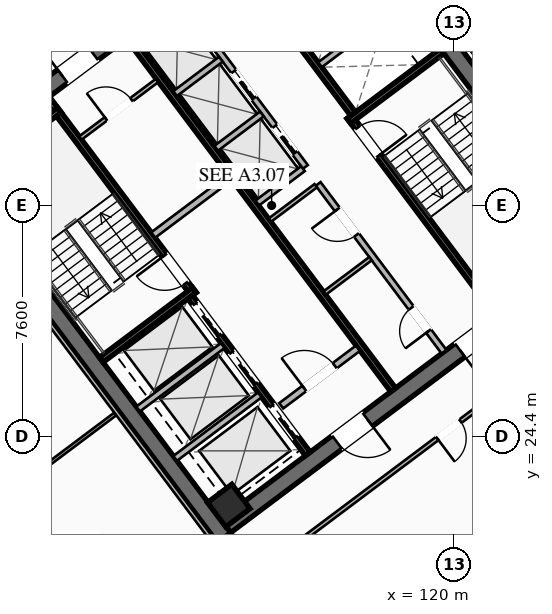
"""IFC4 building model, lengths in metres.
Left out: names, types, materials, properties, quantities, classifications, styles, units other than length and angle.
Written with IfcOpenShell. Run it as: python <this file> out.ifc"""

import sys

from ifc_helpers import new_model, si_unit, direction, frame, frame_2d, origin, origin_2d, place, context, subcontext, project, spatial, rectangle, hollow_rectangle, extrude, element, fill, save


model = new_model("IFC4")
c1 = context("Model", 3, precision=1e-05, world=origin(), true_north=direction((0.0, 1.0)))
c2 = subcontext(c1, "Body", "Model", "MODEL_VIEW")
j1 = project(units=[si_unit("LENGTHUNIT", "METRE"), si_unit("PLANEANGLEUNIT", "RADIAN")], contexts=[c1])
p1 = place(None, origin())
s1 = spatial("IfcSite", under=j1, at=p1, CompositionType="ELEMENT")
p2 = place(p1, origin())
s2 = spatial("IfcBuilding", under=s1, at=p2, CompositionType="ELEMENT")
p3 = place(p2, frame((0.0, 0.0, 192.5)))
s3 = spatial("IfcBuildingStorey", under=s2, at=p3, CompositionType="ELEMENT", Elevation=192.5)
for number, where, z_axis, x_axis in (
    (1, (112.436, 21.077, 0.0), (0.0, 0.0, 1.0), (-0.6, 0.8, 0.0)),
    (2, (115.564, 42.923, 0.0), (0.0, 0.0, 1.0), (0.6, -0.8, 0.0)),
):
    element("IfcWall", number, at=place(p3, frame(where, z_axis=z_axis, x_axis=x_axis)), inside=s3, PredefinedType="SHEAR", context=c2, shape_type="SweptSolid", body=[
        extrude(rectangle(XDim=15.6, YDim=0.55, at=frame_2d((7.8, 0.0))), origin(), (0.0, 0.0, 1.0), 3.55),
    ])
p4 = place(p3, frame((124.539, 30.498, 0.0), z_axis=(0.0, 0.0, 1.0), x_axis=(-0.799998054672, -0.600002593761, 0.0)))
e3 = element("IfcWall", 3, at=p4, inside=s3, PredefinedType="SHEAR", context=c2, shape_type="SweptSolid", body=[
    extrude(rectangle(XDim=15.06, YDim=0.55, at=frame_2d((7.53, 0.0))), origin(), (0.0, 0.0, 1.0), 3.55),
])
p5 = place(p4, frame((9.23, 0.0, 0.0)))
e4 = element("IfcOpeningElement", 4, at=p5, cuts=e3, PredefinedType="OPENING", context=c2, shape_type="SweptSolid", body=[
    extrude(rectangle(XDim=1.25, YDim=2.25, at=frame_2d((0.625, 1.125))), frame((0.0, 0.285, 0.0), z_axis=(0.0, -1.0, 0.0), x_axis=(1.0, 0.0, 0.0)), (0.0, 0.0, 1.0), 0.57),
])
p6 = place(p4, frame((4.18, 0.0, 0.0)))
e5 = element("IfcOpeningElement", 5, at=p6, cuts=e3, PredefinedType="OPENING", context=c2, shape_type="SweptSolid", body=[
    extrude(rectangle(XDim=1.25, YDim=2.25, at=frame_2d((0.625, 1.125))), frame((0.0, 0.285, 0.0), z_axis=(0.0, -1.0, 0.0), x_axis=(1.0, 0.0, 0.0)), (0.0, 0.0, 1.0), 0.57),
])
p7 = place(p3, frame((103.461, 33.502, 0.0), z_axis=(0.0, 0.0, 1.0), x_axis=(0.799998054672, 0.600002593761, 0.0)))
e6 = element("IfcWall", 6, at=p7, inside=s3, PredefinedType="SHEAR", context=c2, shape_type="SweptSolid", body=[
    extrude(rectangle(XDim=15.06, YDim=0.55, at=frame_2d((7.53, 0.0))), origin(), (0.0, 0.0, 1.0), 3.55),
])
p8 = place(p7, frame((4.58, 0.0, 0.0)))
e7 = element("IfcOpeningElement", 7, at=p8, cuts=e6, PredefinedType="OPENING", context=c2, shape_type="SweptSolid", body=[
    extrude(rectangle(XDim=1.25, YDim=2.25, at=frame_2d((0.625, 1.125))), frame((0.0, 0.285, 0.0), z_axis=(0.0, -1.0, 0.0), x_axis=(1.0, 0.0, 0.0)), (0.0, 0.0, 1.0), 0.57),
])
p9 = place(p7, frame((9.63, 0.0, 0.0)))
e8 = element("IfcOpeningElement", 8, at=p9, cuts=e6, PredefinedType="OPENING", context=c2, shape_type="SweptSolid", body=[
    extrude(rectangle(XDim=1.25, YDim=2.25, at=frame_2d((0.625, 1.125))), frame((0.0, 0.285, 0.0), z_axis=(0.0, -1.0, 0.0), x_axis=(1.0, 0.0, 0.0)), (0.0, 0.0, 1.0), 0.57),
])
p10 = place(p3, frame((112.59, 22.13, 0.0), z_axis=(0.0, 0.0, 1.0), x_axis=(0.799999996291, 0.600000004945, 0.0)))
e9 = element("IfcColumn", 9, at=p10, inside=s3, PredefinedType="COLUMN", context=c2, shape_type="SweptSolid", body=[
    extrude(hollow_rectangle(XDim=1.0, YDim=1.0, WallThickness=0.04, at=origin_2d()), origin(), (0.0, 0.0, 1.0), 3.37),
])
p11 = place(p3, frame((111.44, 29.08, 0.0), z_axis=(0.0, 0.0, 1.0), x_axis=(-0.59999029481, 0.8000072788, 0.0)))
e10 = element("IfcWall", 10, at=p11, inside=s3, PredefinedType="SHEAR", context=c2, shape_type="SweptSolid", body=[
    extrude(rectangle(XDim=8.05, YDim=0.2, at=frame_2d((4.025, 0.0))), origin(), (0.0, 0.0, 1.0), 3.37),
])
p12 = place(p11, frame((0.45, 0.0, 0.0)))
e11 = element("IfcOpeningElement", 11, at=p12, cuts=e10, PredefinedType="OPENING", context=c2, shape_type="SweptSolid", body=[
    extrude(rectangle(XDim=1.15, YDim=2.2, at=frame_2d((0.575, 1.1))), frame((0.0, 0.11, 0.0), z_axis=(0.0, -1.0, 0.0), x_axis=(1.0, 0.0, 0.0)), (0.0, 0.0, 1.0), 0.22),
])
for number, where, z_axis, x_axis in (
    (12, (108.396, 26.922, 0.0), (0.0, 0.0, 1.0), (0.8, 0.6, 0.0)),
    (13, (103.956, 32.842, 0.0), (0.0, 0.0, 1.0), (0.8, 0.6, 0.0)),
):
    element("IfcWall", number, at=place(p3, frame(where, z_axis=z_axis, x_axis=x_axis)), inside=s3, PredefinedType="SHEAR", context=c2, shape_type="SweptSolid", body=[
        extrude(rectangle(XDim=3.83, YDim=0.2, at=frame_2d((1.915, 0.0))), origin(), (0.0, 0.0, 1.0), 3.37),
    ])
p13 = place(p3, frame((116.56, 34.92, 0.0), z_axis=(0.0, 0.0, 1.0), x_axis=(0.59999029481, -0.8000072788, 0.0)))
e14 = element("IfcWall", 14, at=p13, inside=s3, PredefinedType="SHEAR", context=c2, shape_type="SweptSolid", body=[
    extrude(rectangle(XDim=8.05, YDim=0.2, at=frame_2d((4.025, 0.0))), origin(), (0.0, 0.0, 1.0), 3.37),
])
p14 = place(p13, frame((0.45, 0.0, 0.0)))
e15 = element("IfcOpeningElement", 15, at=p14, cuts=e14, PredefinedType="OPENING", context=c2, shape_type="SweptSolid", body=[
    extrude(rectangle(XDim=1.15, YDim=2.2, at=frame_2d((0.575, 1.1))), frame((0.0, 0.11, 0.0), z_axis=(0.0, -1.0, 0.0), x_axis=(1.0, 0.0, 0.0)), (0.0, 0.0, 1.0), 0.22),
])
p15 = place(p3, frame((116.54, 34.78, 0.0), z_axis=(0.0, 0.0, 1.0), x_axis=(0.800015298837, 0.599979601008, 0.0)))
e16 = element("IfcWall", 16, at=p15, inside=s3, PredefinedType="SHEAR", context=c2, shape_type="SweptSolid", body=[
    extrude(rectangle(XDim=3.83, YDim=0.2, at=frame_2d((1.915, 0.0))), origin(), (0.0, 0.0, 1.0), 3.37),
])
p16 = place(p3, frame((117.998, 25.936, 0.0), z_axis=(0.0, 0.0, 1.0), x_axis=(-0.600002693989, 0.799997979501, 0.0)))
e17 = element("IfcWall", 17, at=p16, inside=s3, PredefinedType="SHEAR", context=c2, shape_type="SweptSolid", body=[
    extrude(rectangle(XDim=14.5, YDim=0.2, at=frame_2d((7.25, 0.0))), origin(), (0.0, 0.0, 1.0), 3.37),
])
p17 = place(p3, frame((110.104, 31.028, 0.0), z_axis=(0.0, 0.0, 1.0), x_axis=(0.800018601094, 0.59997519774, 0.0)))
e18 = element("IfcWall", 18, at=p17, inside=s3, PredefinedType="SOLIDWALL", context=c2, shape_type="SweptSolid", body=[
    extrude(rectangle(XDim=3.15, YDim=0.22, at=frame_2d((1.575, 0.0))), origin(), (0.0, 0.0, 1.0), 2.723),
])
p18 = place(p3, frame((114.316, 25.412, 0.0), z_axis=(0.0, 0.0, 1.0), x_axis=(0.800018601094, 0.59997519774, 0.0)))
e19 = element("IfcWall", 19, at=p18, inside=s3, PredefinedType="SOLIDWALL", context=c2, shape_type="SweptSolid", body=[
    extrude(rectangle(XDim=3.15, YDim=0.22, at=frame_2d((1.575, 0.0))), origin(), (0.0, 0.0, 1.0), 2.723),
])
p19 = place(p18, frame((0.95, 0.0, 0.0)))
e20 = element("IfcOpeningElement", 20, at=p19, cuts=e19, PredefinedType="OPENING", context=c2, shape_type="SweptSolid", body=[
    extrude(rectangle(XDim=1.25, YDim=2.25, at=frame_2d((0.625, 1.125))), frame((0.0, 0.12, 0.0), z_axis=(0.0, -1.0, 0.0), x_axis=(1.0, 0.0, 0.0)), (0.0, 0.0, 1.0), 0.24),
])
p20 = place(p3, frame((115.19, 23.83, 0.0), z_axis=(0.0, 0.0, 1.0), x_axis=(-0.599993943644, 0.800004542231, 0.0)))
e21 = element("IfcWall", 21, at=p20, inside=s3, PredefinedType="SHEAR", context=c2, shape_type="SweptSolid", body=[
    extrude(rectangle(XDim=6.45, YDim=0.2, at=frame_2d((3.225, 0.0))), origin(), (0.0, 0.0, 1.0), 3.37),
])
p21 = place(p20, frame((4.875, 0.0, 0.0)))
e22 = element("IfcOpeningElement", 22, at=p21, cuts=e21, PredefinedType="OPENING", context=c2, shape_type="SweptSolid", body=[
    extrude(rectangle(XDim=1.3, YDim=2.25, at=frame_2d((0.65, 1.125))), frame((0.0, 0.11, 0.0), z_axis=(0.0, -1.0, 0.0), x_axis=(1.0, 0.0, 0.0)), (0.0, 0.0, 1.0), 0.22),
])
p22 = place(p20, frame((2.875, 0.0, 0.0)))
e23 = element("IfcOpeningElement", 23, at=p22, cuts=e21, PredefinedType="OPENING", context=c2, shape_type="SweptSolid", body=[
    extrude(rectangle(XDim=1.3, YDim=2.25, at=frame_2d((0.65, 1.125))), frame((0.0, 0.11, 0.0), z_axis=(0.0, -1.0, 0.0), x_axis=(1.0, 0.0, 0.0)), (0.0, 0.0, 1.0), 0.22),
])
p23 = place(p20, frame((0.675, 0.0, 0.0)))
e24 = element("IfcOpeningElement", 24, at=p23, cuts=e21, PredefinedType="OPENING", context=c2, shape_type="SweptSolid", body=[
    extrude(rectangle(XDim=1.3, YDim=2.25, at=frame_2d((0.65, 1.125))), frame((0.0, 0.11, 0.0), z_axis=(0.0, -1.0, 0.0), x_axis=(1.0, 0.0, 0.0)), (0.0, 0.0, 1.0), 0.22),
])
for number, where, z_axis, x_axis in (
    (25, (110.826, 23.682, 0.0), (0.0, 0.0, 1.0), (0.8, 0.6, 0.0)),
    (26, (109.608, 25.306, 0.0), (0.0, 0.0, 1.0), (0.8, 0.6, 0.0)),
):
    element("IfcWall", number, at=place(p3, frame(where, z_axis=z_axis, x_axis=x_axis)), inside=s3, PredefinedType="SOLIDWALL", context=c2, shape_type="SweptSolid", body=[
        extrude(rectangle(XDim=3.48, YDim=0.2, at=frame_2d((1.74, 0.0))), origin(), (0.0, 0.0, 1.0), 3.37),
    ])
p24 = place(p3, frame((112.81, 40.17, 0.0), z_axis=(0.0, 0.0, 1.0), x_axis=(0.599993943644, -0.800004542231, 0.0)))
e27 = element("IfcWall", 27, at=p24, inside=s3, PredefinedType="SHEAR", context=c2, shape_type="SweptSolid", body=[
    extrude(rectangle(XDim=6.45, YDim=0.2, at=frame_2d((3.225, 0.0))), origin(), (0.0, 0.0, 1.0), 3.37),
])
p25 = place(p3, frame((115.59, 36.63, 0.0), z_axis=(0.0, 0.0, 1.0), x_axis=(0.799974743577, 0.600033673754, 0.0)))
e28 = element("IfcWall", 28, at=p25, inside=s3, PredefinedType="SOLIDWALL", context=c2, shape_type="SweptSolid", body=[
    extrude(rectangle(XDim=3.48, YDim=0.2, at=frame_2d((1.74, 0.0))), origin(), (0.0, 0.0, 1.0), 3.37),
])
p26 = place(p3, frame((107.71, 34.22, 0.0), z_axis=(0.0, 0.0, 1.0), x_axis=(0.799981399002, 0.60002480053, 0.0)))
e29 = element("IfcWall", 29, at=p26, inside=s3, PredefinedType="PARTITIONING", context=c2, shape_type="SweptSolid", body=[
    extrude(rectangle(XDim=3.15, YDim=0.135, at=frame_2d((1.575, 0.0))), origin(), (0.0, 0.0, 1.0), 2.723),
])
p27 = place(p26, frame((1.05, 0.0, 0.0)))
e30 = element("IfcOpeningElement", 30, at=p27, cuts=e29, PredefinedType="OPENING", context=c2, shape_type="SweptSolid", body=[
    extrude(rectangle(XDim=1.05, YDim=2.2, at=frame_2d((0.525, 1.1))), frame((0.0, 0.077, 0.0), z_axis=(0.0, -1.0, 0.0), x_axis=(1.0, 0.0, 0.0)), (0.0, 0.0, 1.0), 0.155),
])
p28 = place(p3, frame((119.67, 27.19, 0.0), z_axis=(0.0, 0.0, 1.0), x_axis=(-0.599988677396, 0.800008491828, 0.0)))
e31 = element("IfcWall", 31, at=p28, inside=s3, PredefinedType="SOLIDWALL", context=c2, shape_type="SweptSolid", body=[
    extrude(rectangle(XDim=6.9, YDim=0.2, at=frame_2d((3.45, 0.0))), origin(), (0.0, 0.0, 1.0), 2.723),
])
p29 = place(p28, frame((0.85, 0.0, 0.0)))
e32 = element("IfcOpeningElement", 32, at=p29, cuts=e31, PredefinedType="OPENING", context=c2, shape_type="SweptSolid", body=[
    extrude(rectangle(XDim=0.95, YDim=2.05, at=frame_2d((0.475, 1.025))), frame((0.0, 0.11, 0.0), z_axis=(0.0, -1.0, 0.0), x_axis=(1.0, 0.0, 0.0)), (0.0, 0.0, 1.0), 0.22),
])
p30 = place(p28, frame((4.8, 0.0, 0.0)))
e33 = element("IfcOpeningElement", 33, at=p30, cuts=e31, PredefinedType="OPENING", context=c2, shape_type="SweptSolid", body=[
    extrude(rectangle(XDim=1.05, YDim=2.2, at=frame_2d((0.525, 1.1))), frame((0.0, 0.11, 0.0), z_axis=(0.0, -1.0, 0.0), x_axis=(1.0, 0.0, 0.0)), (0.0, 0.0, 1.0), 0.22),
])
for number, where, z_axis, x_axis in (
    (34, (113.946, 31.522, 0.0), (0.0, 0.0, 1.0), (0.8, 0.6, 0.0)),
    (35, (115.746, 29.122, 0.0), (0.0, 0.0, 1.0), (0.8, 0.6, 0.0)),
):
    element("IfcWall", number, at=place(p3, frame(where, z_axis=z_axis, x_axis=x_axis)), inside=s3, PredefinedType="PARTITIONING", context=c2, shape_type="SweptSolid", body=[
        extrude(rectangle(XDim=1.88, YDim=0.135, at=frame_2d((0.94, 0.0))), origin(), (0.0, 0.0, 1.0), 2.723),
    ])
p31 = place(p3, frame((115.11, 33.27, 0.0), z_axis=(0.0, 0.0, 1.0), x_axis=(-0.600011322243, 0.799991508192, 0.0)))
e36 = element("IfcWall", 36, at=p31, inside=s3, PredefinedType="SOLIDWALL", context=c2, shape_type="SweptSolid", body=[
    extrude(rectangle(XDim=6.9, YDim=0.2, at=frame_2d((3.45, 0.0))), origin(), (0.0, 0.0, 1.0), 3.37),
])
p32 = place(p31, frame((0.575, 0.0, 0.0)))
e37 = element("IfcOpeningElement", 37, at=p32, cuts=e36, PredefinedType="OPENING", context=c2, shape_type="SweptSolid", body=[
    extrude(rectangle(XDim=1.1, YDim=2.2, at=frame_2d((0.55, 1.1))), frame((0.0, 0.11, 0.0), z_axis=(0.0, -1.0, 0.0), x_axis=(1.0, 0.0, 0.0)), (0.0, 0.0, 1.0), 0.22),
])
p33 = place(p31, frame((2.825, 0.0, 0.0)))
e38 = element("IfcOpeningElement", 38, at=p33, cuts=e36, PredefinedType="OPENING", context=c2, shape_type="SweptSolid", body=[
    extrude(rectangle(XDim=1.1, YDim=2.2, at=frame_2d((0.55, 1.1))), frame((0.0, 0.11, 0.0), z_axis=(0.0, -1.0, 0.0), x_axis=(1.0, 0.0, 0.0)), (0.0, 0.0, 1.0), 0.22),
])
p34 = place(p31, frame((5.075, 0.0, 0.0)))
e39 = element("IfcOpeningElement", 39, at=p34, cuts=e36, PredefinedType="OPENING", context=c2, shape_type="SweptSolid", body=[
    extrude(rectangle(XDim=1.1, YDim=2.2, at=frame_2d((0.55, 1.1))), frame((0.0, 0.11, 0.0), z_axis=(0.0, -1.0, 0.0), x_axis=(1.0, 0.0, 0.0)), (0.0, 0.0, 1.0), 0.22),
])
p35 = place(p3, frame((113.526, 32.082, 0.0), z_axis=(0.0, 0.0, 1.0), x_axis=(0.800046745961, 0.599937666993, 0.0)))
e40 = element("IfcWall", 40, at=p35, inside=s3, PredefinedType="SOLIDWALL", context=c2, shape_type="SweptSolid", body=[
    extrude(rectangle(XDim=1.88, YDim=0.2, at=frame_2d((0.94, 0.0))), origin(), (0.0, 0.0, 1.0), 3.37),
])
p36 = place(p3, frame((112.176, 33.882, 0.0), z_axis=(0.0, 0.0, 1.0), x_axis=(0.8, 0.6, 0.0)))
e41 = element("IfcWall", 41, at=p36, inside=s3, PredefinedType="SOLIDWALL", context=c2, shape_type="SweptSolid", body=[
    extrude(rectangle(XDim=1.88, YDim=0.2, at=frame_2d((0.94, 0.0))), origin(), (0.0, 0.0, 1.0), 3.37),
])
p37 = place(p3, frame((110.826, 35.682, 0.0), z_axis=(0.0, 0.0, 1.0), x_axis=(0.799984418148, 0.600020775241, 0.0)))
e42 = element("IfcWall", 42, at=p37, inside=s3, PredefinedType="SOLIDWALL", context=c2, shape_type="SweptSolid", body=[
    extrude(rectangle(XDim=1.88, YDim=0.2, at=frame_2d((0.94, 0.0))), origin(), (0.0, 0.0, 1.0), 3.37),
])
p38 = place(p3, frame((96.718, 31.126, 0.0), z_axis=(0.0, 0.0, 1.0), x_axis=(0.8, 0.6, 0.0)))
e43 = element("IfcWall", 43, at=p38, inside=s3, PredefinedType="PARTITIONING", context=c2, shape_type="SweptSolid", body=[
    extrude(rectangle(XDim=28.7, YDim=0.135, at=frame_2d((14.35, 0.0))), origin(), (0.0, 0.0, 1.0), 2.723),
])
p39 = place(p38, frame((0.3, 0.0, 0.0)))
e44 = element("IfcOpeningElement", 44, at=p39, cuts=e43, PredefinedType="OPENING", context=c2, shape_type="SweptSolid", body=[
    extrude(rectangle(XDim=0.95, YDim=2.05, at=frame_2d((0.475, 1.025))), frame((0.0, 0.077, 0.0), z_axis=(0.0, -1.0, 0.0), x_axis=(1.0, 0.0, 0.0)), (0.0, 0.0, 1.0), 0.155),
])
p40 = place(p38, frame((14.138, 0.0, 0.0)))
e45 = element("IfcOpeningElement", 45, at=p40, cuts=e43, PredefinedType="OPENING", context=c2, shape_type="SweptSolid", body=[
    extrude(rectangle(XDim=0.95, YDim=2.05, at=frame_2d((0.475, 1.025))), frame((0.0, 0.077, 0.0), z_axis=(0.0, -1.0, 0.0), x_axis=(1.0, 0.0, 0.0)), (0.0, 0.0, 1.0), 0.155),
])
p41 = place(p38, frame((27.45, 0.0, 0.0)))
e46 = element("IfcOpeningElement", 46, at=p41, cuts=e43, PredefinedType="OPENING", context=c2, shape_type="SweptSolid", body=[
    extrude(rectangle(XDim=0.95, YDim=2.05, at=frame_2d((0.475, 1.025))), frame((0.0, 0.077, 0.0), z_axis=(0.0, -1.0, 0.0), x_axis=(1.0, 0.0, 0.0)), (0.0, 0.0, 1.0), 0.155),
])
p42 = place(p3, frame((131.12, 33.09, 0.0), z_axis=(0.0, 0.0, 1.0), x_axis=(-0.800003062365, -0.599995916825, 0.0)))
e47 = element("IfcWall", 47, at=p42, inside=s3, PredefinedType="PARTITIONING", context=c2, shape_type="SweptSolid", body=[
    extrude(rectangle(XDim=28.7, YDim=0.135, at=frame_2d((14.35, 0.0))), origin(), (0.0, 0.0, 1.0), 2.723),
])
p43 = place(p42, frame((27.37, 0.0, 0.0)))
e48 = element("IfcOpeningElement", 48, at=p43, cuts=e47, PredefinedType="OPENING", context=c2, shape_type="SweptSolid", body=[
    extrude(rectangle(XDim=0.95, YDim=2.05, at=frame_2d((0.475, 1.025))), frame((0.0, 0.077, 0.0), z_axis=(0.0, -1.0, 0.0), x_axis=(1.0, 0.0, 0.0)), (0.0, 0.0, 1.0), 0.155),
])
p44 = place(p42, frame((13.638, 0.0, 0.0)))
e49 = element("IfcOpeningElement", 49, at=p44, cuts=e47, PredefinedType="OPENING", context=c2, shape_type="SweptSolid", body=[
    extrude(rectangle(XDim=0.95, YDim=2.05, at=frame_2d((0.475, 1.025))), frame((0.0, 0.077, 0.0), z_axis=(0.0, -1.0, 0.0), x_axis=(1.0, 0.0, 0.0)), (0.0, 0.0, 1.0), 0.155),
])
p45 = place(p42, frame((0.38, 0.0, 0.0)))
e50 = element("IfcOpeningElement", 50, at=p45, cuts=e47, PredefinedType="OPENING", context=c2, shape_type="SweptSolid", body=[
    extrude(rectangle(XDim=0.95, YDim=2.05, at=frame_2d((0.475, 1.025))), frame((0.0, 0.077, 0.0), z_axis=(0.0, -1.0, 0.0), x_axis=(1.0, 0.0, 0.0)), (0.0, 0.0, 1.0), 0.155),
])
p46 = place(p3, frame((112.104, 20.928, 0.0), z_axis=(0.0, 0.0, 1.0), x_axis=(-0.599994940075, 0.800003794918, 0.0)))
e51 = element("IfcWall", 51, at=p46, inside=s3, PredefinedType="PARTITIONING", context=c2, shape_type="SweptSolid", body=[
    extrude(rectangle(XDim=15.44, YDim=0.135, at=frame_2d((7.72, 0.0))), origin(), (0.0, 0.0, 1.0), 2.723),
])
p47 = place(p3, frame((102.016, 20.012, 0.0), z_axis=(0.0, 0.0, 1.0), x_axis=(0.799989708052, 0.600013722352, 0.0)))
e52 = element("IfcWall", 52, at=p47, inside=s3, PredefinedType="PARTITIONING", context=c2, shape_type="SweptSolid", body=[
    extrude(rectangle(XDim=8.54, YDim=0.11, at=frame_2d((4.27, 0.0))), origin(), (0.0, 0.0, 1.0), 2.723),
])
p48 = place(p8, origin())
e53 = element("IfcDoor", 53, at=p48, inside=s3, OperationType="SINGLE_SWING_LEFT", PredefinedType="DOOR", context=c2, shape_type="SweptSolid", body=[
    extrude(rectangle(XDim=1.25, YDim=2.25, at=frame_2d((0.625, 1.125))), frame((0.0, 0.025, 0.0), z_axis=(0.0, -1.0, 0.0), x_axis=(1.0, 0.0, 0.0)), (0.0, 0.0, 1.0), 0.05),
])
fill(e7, e53)
p49 = place(p5, origin())
e54 = element("IfcDoor", 54, at=p49, inside=s3, OperationType="SINGLE_SWING_LEFT", PredefinedType="DOOR", context=c2, shape_type="SweptSolid", body=[
    extrude(rectangle(XDim=1.25, YDim=2.25, at=frame_2d((0.625, 1.125))), frame((0.0, 0.025, 0.0), z_axis=(0.0, -1.0, 0.0), x_axis=(1.0, 0.0, 0.0)), (0.0, 0.0, 1.0), 0.05),
])
fill(e4, e54)
p50 = place(p6, origin())
e55 = element("IfcDoor", 55, at=p50, inside=s3, OperationType="SINGLE_SWING_RIGHT", PredefinedType="DOOR", context=c2, shape_type="SweptSolid", body=[
    extrude(rectangle(XDim=1.25, YDim=2.25, at=frame_2d((0.625, 1.125))), frame((0.0, 0.025, 0.0), z_axis=(0.0, -1.0, 0.0), x_axis=(1.0, 0.0, 0.0)), (0.0, 0.0, 1.0), 0.05),
])
fill(e5, e55)
p51 = place(p12, origin())
e56 = element("IfcDoor", 56, at=p51, inside=s3, OperationType="SINGLE_SWING_RIGHT", PredefinedType="DOOR", context=c2, shape_type="SweptSolid", body=[
    extrude(rectangle(XDim=1.15, YDim=2.2, at=frame_2d((0.575, 1.1))), frame((0.0, 0.025, 0.0), z_axis=(0.0, -1.0, 0.0), x_axis=(1.0, 0.0, 0.0)), (0.0, 0.0, 1.0), 0.05),
])
fill(e11, e56)
p52 = place(p14, origin())
e57 = element("IfcDoor", 57, at=p52, inside=s3, OperationType="SINGLE_SWING_RIGHT", PredefinedType="DOOR", context=c2, shape_type="SweptSolid", body=[
    extrude(rectangle(XDim=1.15, YDim=2.2, at=frame_2d((0.575, 1.1))), frame((0.0, 0.025, 0.0), z_axis=(0.0, -1.0, 0.0), x_axis=(1.0, 0.0, 0.0)), (0.0, 0.0, 1.0), 0.05),
])
fill(e15, e57)
p53 = place(p19, origin())
e58 = element("IfcDoor", 58, at=p53, inside=s3, OperationType="SINGLE_SWING_LEFT", PredefinedType="DOOR", context=c2, shape_type="SweptSolid", body=[
    extrude(rectangle(XDim=1.25, YDim=2.25, at=frame_2d((0.625, 1.125))), frame((0.0, 0.025, 0.0), z_axis=(0.0, -1.0, 0.0), x_axis=(1.0, 0.0, 0.0)), (0.0, 0.0, 1.0), 0.05),
])
fill(e20, e58)
p54 = place(p27, origin())
e59 = element("IfcDoor", 59, at=p54, inside=s3, OperationType="SINGLE_SWING_LEFT", PredefinedType="DOOR", context=c2, shape_type="SweptSolid", body=[
    extrude(rectangle(XDim=1.05, YDim=2.2, at=frame_2d((0.525, 1.1))), frame((0.0, 0.025, 0.0), z_axis=(0.0, -1.0, 0.0), x_axis=(1.0, 0.0, 0.0)), (0.0, 0.0, 1.0), 0.05),
])
fill(e30, e59)
p55 = place(p29, origin())
e60 = element("IfcDoor", 60, at=p55, inside=s3, OperationType="SINGLE_SWING_LEFT", PredefinedType="DOOR", context=c2, shape_type="SweptSolid", body=[
    extrude(rectangle(XDim=0.95, YDim=2.05, at=frame_2d((0.475, 1.025))), frame((0.0, 0.025, 0.0), z_axis=(0.0, -1.0, 0.0), x_axis=(1.0, 0.0, 0.0)), (0.0, 0.0, 1.0), 0.05),
])
fill(e32, e60)
p56 = place(p30, origin())
e61 = element("IfcDoor", 61, at=p56, inside=s3, OperationType="SINGLE_SWING_RIGHT", PredefinedType="DOOR", context=c2, shape_type="SweptSolid", body=[
    extrude(rectangle(XDim=1.05, YDim=2.2, at=frame_2d((0.525, 1.1))), frame((0.0, 0.025, 0.0), z_axis=(0.0, -1.0, 0.0), x_axis=(1.0, 0.0, 0.0)), (0.0, 0.0, 1.0), 0.05),
])
fill(e33, e61)
p57 = place(p44, origin())
e62 = element("IfcDoor", 62, at=p57, inside=s3, OperationType="SINGLE_SWING_RIGHT", PredefinedType="DOOR", context=c2, shape_type="SweptSolid", body=[
    extrude(rectangle(XDim=0.95, YDim=2.05, at=frame_2d((0.475, 1.025))), frame((0.0, 0.025, 0.0), z_axis=(0.0, -1.0, 0.0), x_axis=(1.0, 0.0, 0.0)), (0.0, 0.0, 1.0), 0.05),
])
fill(e49, e62)
p58 = place(p21, origin())
e63 = element("IfcDoor", 63, at=p58, inside=s3, OperationType="SLIDING_TO_LEFT", PredefinedType="DOOR", context=c2, shape_type="SweptSolid", body=[
    extrude(rectangle(XDim=1.3, YDim=2.25, at=frame_2d((0.65, 1.125))), frame((0.0, 0.025, 0.0), z_axis=(0.0, -1.0, 0.0), x_axis=(1.0, 0.0, 0.0)), (0.0, 0.0, 1.0), 0.05),
])
fill(e22, e63)
p59 = place(p22, origin())
e64 = element("IfcDoor", 64, at=p59, inside=s3, OperationType="SLIDING_TO_LEFT", PredefinedType="DOOR", context=c2, shape_type="SweptSolid", body=[
    extrude(rectangle(XDim=1.3, YDim=2.25, at=frame_2d((0.65, 1.125))), frame((0.0, 0.025, 0.0), z_axis=(0.0, -1.0, 0.0), x_axis=(1.0, 0.0, 0.0)), (0.0, 0.0, 1.0), 0.05),
])
fill(e23, e64)
p60 = place(p23, origin())
e65 = element("IfcDoor", 65, at=p60, inside=s3, OperationType="SLIDING_TO_LEFT", PredefinedType="DOOR", context=c2, shape_type="SweptSolid", body=[
    extrude(rectangle(XDim=1.3, YDim=2.25, at=frame_2d((0.65, 1.125))), frame((0.0, 0.025, 0.0), z_axis=(0.0, -1.0, 0.0), x_axis=(1.0, 0.0, 0.0)), (0.0, 0.0, 1.0), 0.05),
])
fill(e24, e65)
p61 = place(p32, origin())
e66 = element("IfcDoor", 66, at=p61, inside=s3, OperationType="SLIDING_TO_LEFT", PredefinedType="DOOR", context=c2, shape_type="SweptSolid", body=[
    extrude(rectangle(XDim=1.1, YDim=2.2, at=frame_2d((0.55, 1.1))), frame((0.0, 0.025, 0.0), z_axis=(0.0, -1.0, 0.0), x_axis=(1.0, 0.0, 0.0)), (0.0, 0.0, 1.0), 0.05),
])
fill(e37, e66)
p62 = place(p33, origin())
e67 = element("IfcDoor", 67, at=p62, inside=s3, OperationType="SLIDING_TO_LEFT", PredefinedType="DOOR", context=c2, shape_type="SweptSolid", body=[
    extrude(rectangle(XDim=1.1, YDim=2.2, at=frame_2d((0.55, 1.1))), frame((0.0, 0.025, 0.0), z_axis=(0.0, -1.0, 0.0), x_axis=(1.0, 0.0, 0.0)), (0.0, 0.0, 1.0), 0.05),
])
fill(e38, e67)
save(model, sys.argv[1])
